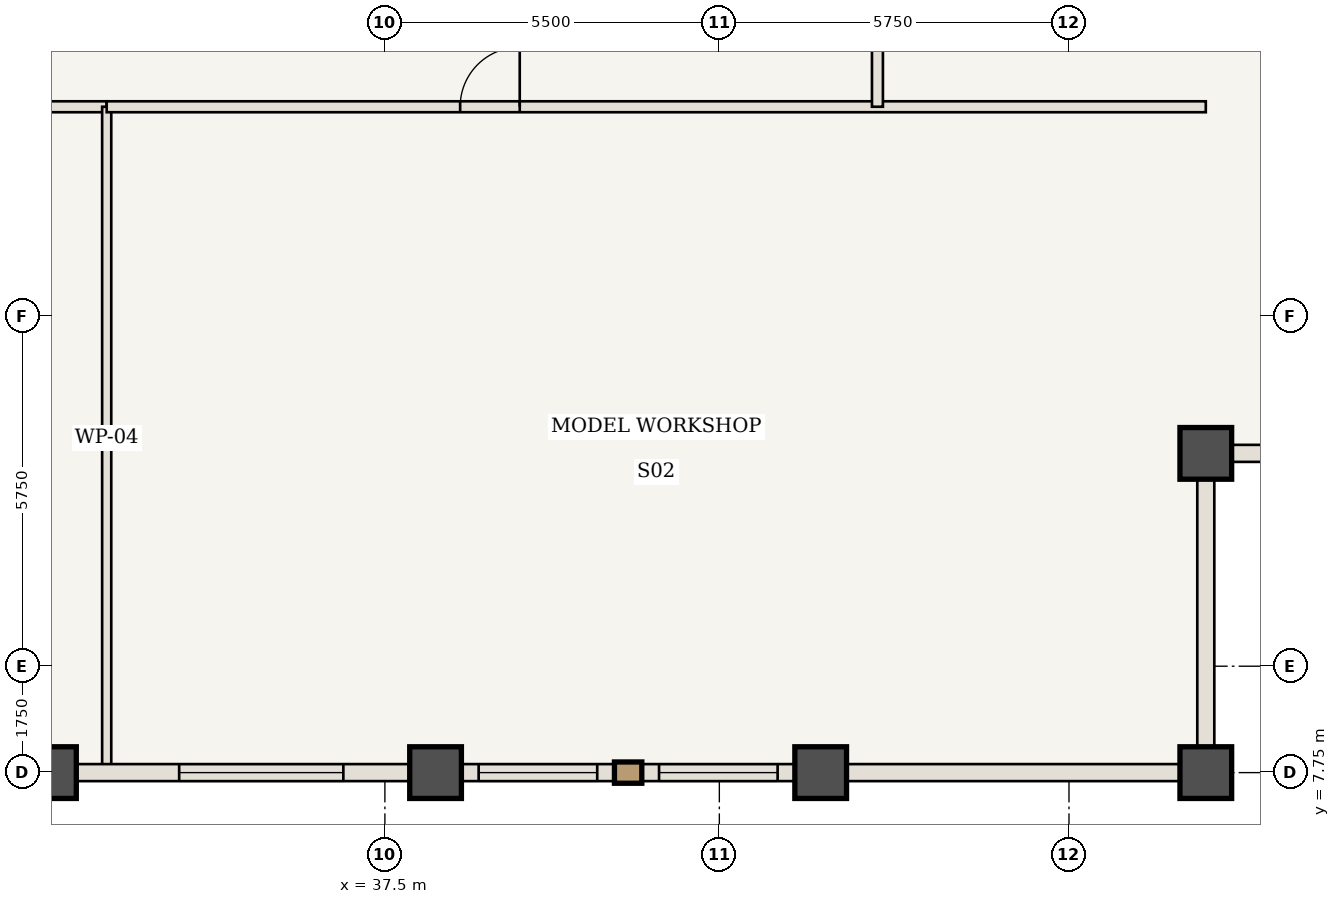
"""IFC4 building model, lengths in metres.
Left out: names, types, materials, properties, quantities, classifications, styles, units other than length and angle.
Written with IfcOpenShell. Run it as: python <this file> out.ifc"""

import sys

from ifc_helpers import new_model, si_unit, direction, frame, frame_2d, origin, origin_2d, place, context, subcontext, project, spatial, rectangle, extrude, element, fill, save


model = new_model("IFC4")
c1 = context("Model", 3, precision=1e-05, world=origin(), true_north=direction((0.0, 1.0)))
c2 = subcontext(c1, "Body", "Model", "MODEL_VIEW")
j1 = project(units=[si_unit("LENGTHUNIT", "METRE"), si_unit("PLANEANGLEUNIT", "RADIAN")], contexts=[c1])
p1 = place(None, origin())
s1 = spatial("IfcSite", under=j1, at=p1, CompositionType="ELEMENT")
p2 = place(p1, origin())
s2 = spatial("IfcBuilding", under=s1, at=p2, CompositionType="ELEMENT")
p3 = place(p2, frame((0.0, 0.0, 217.7)))
s3 = spatial("IfcBuildingStorey", under=s2, at=p3, CompositionType="ELEMENT", Elevation=217.7)
for number, where, z_axis, x_axis in (
    (1, (51.0, 7.75, 0.0), (0.0, 0.0, 1.0), (1.0, 0.0, 0.0)),
    (2, (51.0, 13.0, 0.0), (0.0, 0.0, 1.0), (1.0, 0.0, 0.0)),
    (3, (32.0, 7.75, 0.0), (0.0, 0.0, 1.0), (1.0, 0.0, 0.0)),
    (4, (38.333, 7.75, 0.0), (0.0, 0.0, 1.0), (1.0, 0.0, 0.0)),
    (5, (44.667, 7.75, 0.0), (0.0, 0.0, 1.0), (1.0, 0.0, 0.0)),
):
    element("IfcColumn", number, at=place(p3, frame(where, z_axis=z_axis, x_axis=x_axis)), inside=s3, PredefinedType="COLUMN", context=c2, shape_type="SweptSolid", body=[
        extrude(rectangle(XDim=0.85, YDim=0.85, at=origin_2d()), origin(), (0.0, 0.0, 1.0), 3.85),
    ])
p4 = place(p3, frame((13.0, 18.7, 0.0), z_axis=(0.0, 0.0, 1.0), x_axis=(1.0, 0.0, 0.0)))
e6 = element("IfcWall", 6, at=p4, inside=s3, PredefinedType="STANDARD", context=c2, shape_type="SweptSolid", body=[
    extrude(rectangle(XDim=19.925, YDim=0.18, at=frame_2d((9.962, 0.0))), origin(), (0.0, 0.0, 1.0), 3.685),
])
p5 = place(p4, frame((12.312, 0.0, 0.0)))
e7 = element("IfcOpeningElement", 7, at=p5, cuts=e6, PredefinedType="OPENING", context=c2, shape_type="SweptSolid", body=[
    extrude(rectangle(XDim=0.98, YDim=2.2, at=frame_2d((0.49, 1.1))), frame((0.0, 0.1, 0.0), z_axis=(0.0, -1.0, 0.0), x_axis=(1.0, 0.0, 0.0)), (0.0, 0.0, 1.0), 0.2),
])
p6 = place(p3, frame((32.925, 7.81, 0.0), z_axis=(0.0, 0.0, 1.0), x_axis=(0.0, 1.0, 0.0)))
e8 = element("IfcWall", 8, at=p6, inside=s3, PredefinedType="STANDARD", context=c2, shape_type="SweptSolid", body=[
    extrude(rectangle(XDim=10.89, YDim=0.15, at=frame_2d((5.445, 0.0))), origin(), (0.0, 0.0, 1.0), 3.685),
])
p7 = place(p3, frame((32.925, 18.7, 0.0), z_axis=(0.0, 0.0, 1.0), x_axis=(1.0, 0.0, 0.0)))
e9 = element("IfcWall", 9, at=p7, inside=s3, PredefinedType="STANDARD", context=c2, shape_type="SweptSolid", body=[
    extrude(rectangle(XDim=18.075, YDim=0.18, at=frame_2d((9.038, 0.0))), origin(), (0.0, 0.0, 1.0), 3.685),
])
p8 = place(p7, frame((5.812, 0.0, 0.0)))
e10 = element("IfcOpeningElement", 10, at=p8, cuts=e9, PredefinedType="OPENING", context=c2, shape_type="SweptSolid", body=[
    extrude(rectangle(XDim=0.98, YDim=2.2, at=frame_2d((0.49, 1.1))), frame((0.0, 0.1, 0.0), z_axis=(0.0, -1.0, 0.0), x_axis=(1.0, 0.0, 0.0)), (0.0, 0.0, 1.0), 0.2),
])
p9 = place(p3, frame((45.6, 18.7, 0.0), z_axis=(0.0, 0.0, 1.0), x_axis=(0.0, 1.0, 0.0)))
e11 = element("IfcWall", 11, at=p9, inside=s3, PredefinedType="STANDARD", context=c2, shape_type="SweptSolid", body=[
    extrude(rectangle(XDim=14.15, YDim=0.18, at=frame_2d((7.075, 0.0))), origin(), (0.0, 0.0, 1.0), 3.685),
])
p10 = place(p9, frame((6.575, 0.0, 0.0)))
e12 = element("IfcOpeningElement", 12, at=p10, cuts=e11, PredefinedType="OPENING", context=c2, shape_type="SweptSolid", body=[
    extrude(rectangle(XDim=0.98, YDim=2.2, at=frame_2d((0.49, 1.1))), frame((0.0, 0.1, 0.0), z_axis=(0.0, -1.0, 0.0), x_axis=(1.0, 0.0, 0.0)), (0.0, 0.0, 1.0), 0.2),
])
p11 = place(p3, frame((38.333, 7.75, 0.0), z_axis=(0.0, 0.0, 1.0), x_axis=(-1.0, 0.0, 0.0)))
e13 = element("IfcWall", 13, at=p11, inside=s3, PredefinedType="USERDEFINED", context=c2, shape_type="SweptSolid", body=[
    extrude(rectangle(XDim=6.333, YDim=0.28, at=frame_2d((3.167, 0.0))), origin(), (0.0, 0.0, 1.0), 2.985),
])
p12 = place(p11, frame((1.517, 0.0, 0.85)))
e14 = element("IfcOpeningElement", 14, at=p12, cuts=e13, PredefinedType="OPENING", context=c2, shape_type="SweptSolid", body=[
    extrude(rectangle(XDim=2.7, YDim=1.935, at=frame_2d((1.35, 0.968))), frame((0.0, 0.15, 0.0), z_axis=(0.0, -1.0, 0.0), x_axis=(1.0, 0.0, 0.0)), (0.0, 0.0, 1.0), 0.3),
])
p13 = place(p3, frame((44.667, 7.75, 0.0), z_axis=(0.0, 0.0, 1.0), x_axis=(-1.0, 0.0, 0.0)))
e15 = element("IfcWall", 15, at=p13, inside=s3, PredefinedType="USERDEFINED", context=c2, shape_type="SweptSolid", body=[
    extrude(rectangle(XDim=6.333, YDim=0.28, at=frame_2d((3.167, 0.0))), origin(), (0.0, 0.0, 1.0), 2.985),
])
p14 = place(p13, frame((0.708, 0.0, 0.85)))
e16 = element("IfcOpeningElement", 16, at=p14, cuts=e15, PredefinedType="OPENING", context=c2, shape_type="SweptSolid", body=[
    extrude(rectangle(XDim=1.95, YDim=1.935, at=frame_2d((0.975, 0.968))), frame((0.0, 0.15, 0.0), z_axis=(0.0, -1.0, 0.0), x_axis=(1.0, 0.0, 0.0)), (0.0, 0.0, 1.0), 0.3),
])
p15 = place(p13, frame((3.675, 0.0, 0.85)))
e17 = element("IfcOpeningElement", 17, at=p15, cuts=e15, PredefinedType="OPENING", context=c2, shape_type="SweptSolid", body=[
    extrude(rectangle(XDim=1.95, YDim=1.935, at=frame_2d((0.975, 0.968))), frame((0.0, 0.15, 0.0), z_axis=(0.0, -1.0, 0.0), x_axis=(1.0, 0.0, 0.0)), (0.0, 0.0, 1.0), 0.3),
])
p16 = place(p3, frame((51.0, 7.75, 0.0), z_axis=(0.0, 0.0, 1.0), x_axis=(-1.0, 0.0, 0.0)))
e18 = element("IfcWall", 18, at=p16, inside=s3, PredefinedType="USERDEFINED", context=c2, shape_type="SweptSolid", body=[
    extrude(rectangle(XDim=6.333, YDim=0.28, at=frame_2d((3.167, 0.0))), origin(), (0.0, 0.0, 1.0), 2.985),
])
for number, where, z_axis, x_axis in (
    (19, (51.0, 13.0, 0.0), (0.0, 0.0, 1.0), (0.0, -1.0, 0.0)),
    (20, (56.25, 13.0, 0.0), (0.0, 0.0, 1.0), (-1.0, 0.0, 0.0)),
):
    element("IfcWall", number, at=place(p3, frame(where, z_axis=z_axis, x_axis=x_axis)), inside=s3, PredefinedType="USERDEFINED", context=c2, shape_type="SweptSolid", body=[
        extrude(rectangle(XDim=5.25, YDim=0.28, at=frame_2d((2.625, 0.0))), origin(), (0.0, 0.0, 1.0), 2.985),
    ])
p17 = place(p8, origin())
e21 = element("IfcDoor", 21, at=p17, inside=s3, OperationType="SINGLE_SWING_RIGHT", PredefinedType="DOOR", context=c2, shape_type="SweptSolid", body=[
    extrude(rectangle(XDim=0.98, YDim=2.2, at=frame_2d((0.49, 1.1))), frame((0.0, 0.025, 0.0), z_axis=(0.0, -1.0, 0.0), x_axis=(1.0, 0.0, 0.0)), (0.0, 0.0, 1.0), 0.05),
])
fill(e10, e21)
p18 = place(p12, origin())
e22 = element("IfcWindow", 22, at=p18, inside=s3, PartitioningType="SINGLE_PANEL", PredefinedType="WINDOW", context=c2, shape_type="SweptSolid", body=[
    extrude(rectangle(XDim=2.7, YDim=1.935, at=frame_2d((1.35, 0.968))), frame((0.0, 0.03, 0.0), z_axis=(0.0, -1.0, 0.0), x_axis=(1.0, 0.0, 0.0)), (0.0, 0.0, 1.0), 0.06),
])
fill(e14, e22)
p19 = place(p14, origin())
e23 = element("IfcWindow", 23, at=p19, inside=s3, PartitioningType="SINGLE_PANEL", PredefinedType="WINDOW", context=c2, shape_type="SweptSolid", body=[
    extrude(rectangle(XDim=1.95, YDim=1.935, at=frame_2d((0.975, 0.968))), frame((0.0, 0.03, 0.0), z_axis=(0.0, -1.0, 0.0), x_axis=(1.0, 0.0, 0.0)), (0.0, 0.0, 1.0), 0.06),
])
fill(e16, e23)
p20 = place(p15, origin())
e24 = element("IfcWindow", 24, at=p20, inside=s3, PartitioningType="SINGLE_PANEL", PredefinedType="WINDOW", context=c2, shape_type="SweptSolid", body=[
    extrude(rectangle(XDim=1.95, YDim=1.935, at=frame_2d((0.975, 0.968))), frame((0.0, 0.03, 0.0), z_axis=(0.0, -1.0, 0.0), x_axis=(1.0, 0.0, 0.0)), (0.0, 0.0, 1.0), 0.06),
])
fill(e17, e24)
save(model, sys.argv[1])
